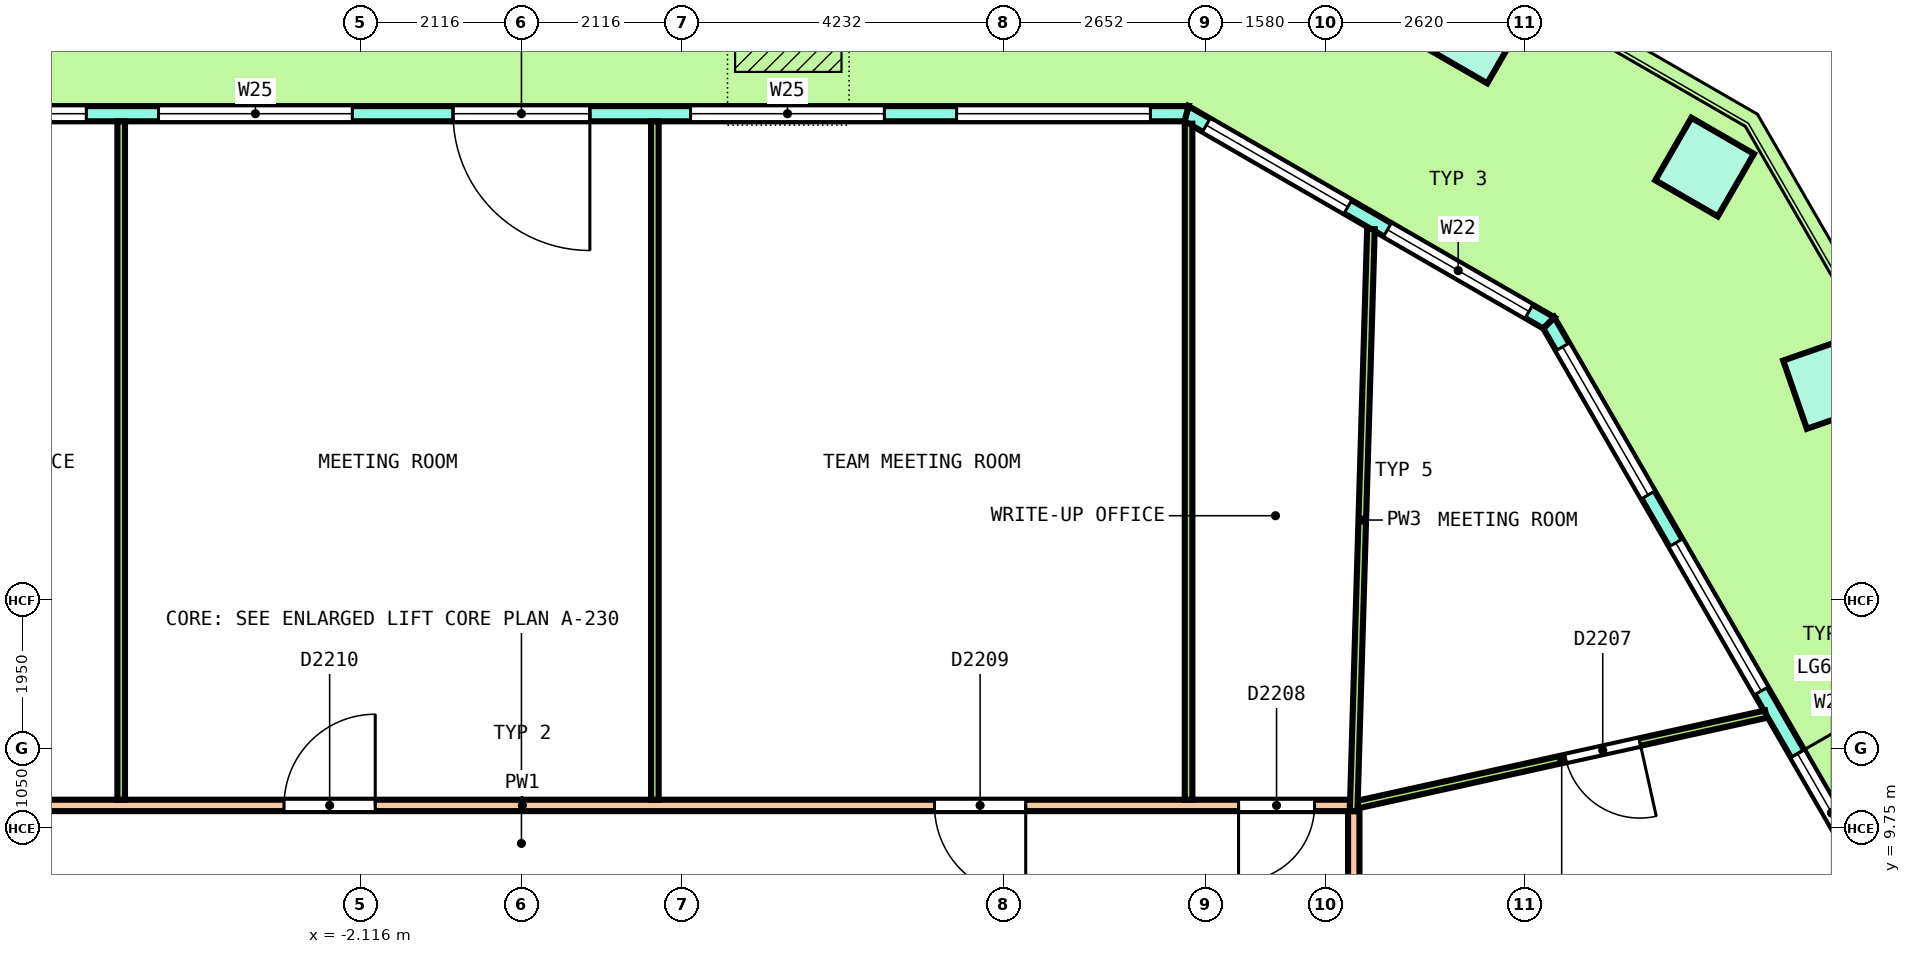
"""IFC4 building model, lengths in metres.
Left out: names, types, materials, properties, quantities, classifications, styles, units other than length and angle.
Written with IfcOpenShell. Run it as: python <this file> out.ifc"""

import sys

from ifc_helpers import new_model, si_unit, direction, frame, frame_2d, origin, origin_2d, place, context, subcontext, project, spatial, polyline, rectangle, outline, extrude, element, fill, save


model = new_model("IFC4")
c1 = context("Model", 3, precision=1e-05, world=origin(), true_north=direction((0.0, 1.0)))
c2 = subcontext(c1, "Body", "Model", "MODEL_VIEW")
j1 = project(units=[si_unit("LENGTHUNIT", "METRE"), si_unit("PLANEANGLEUNIT", "RADIAN")], contexts=[c1])
p1 = place(None, origin())
s1 = spatial("IfcSite", under=j1, at=p1, CompositionType="ELEMENT")
p2 = place(p1, origin())
s2 = spatial("IfcBuilding", under=s1, at=p2, CompositionType="ELEMENT")
p3 = place(p2, frame((0.0, 0.0, 287.0)))
s3 = spatial("IfcBuildingStorey", under=s2, at=p3, CompositionType="ELEMENT", Elevation=287.0)
p4 = place(p3, frame((17.204, 15.61, 0.0), z_axis=(0.032624119908, 0.006284154245, 0.999447935715), x_axis=(-0.500158635794, 0.8658654173, 0.01088201104)))
e1 = element("IfcColumn", 1, at=p4, inside=s3, PredefinedType="COLUMN", context=c2, shape_type="SweptSolid", body=[
    extrude(rectangle(XDim=0.95, YDim=0.95, at=origin_2d()), origin(), (0.0, 0.0, 1.0), 3.652),
])
for number, where, z_axis, x_axis in (
    (2, (15.566, 18.448, 0.0), (0.036, 0.0, 0.999), (-0.865, 0.5, 0.031)),
    (3, (12.533, 20.199, 0.0), (0.036, 0.0, 0.999), (-0.865, 0.5, 0.031)),
):
    element("IfcColumn", number, at=place(p3, frame(where, z_axis=z_axis, x_axis=x_axis)), inside=s3, PredefinedType="COLUMN", context=c2, shape_type="SweptSolid", body=[
        extrude(rectangle(XDim=0.95, YDim=0.95, at=origin_2d()), origin(), (0.0, 0.0, 1.0), 3.652),
    ])
p5 = place(p3, frame((20.959, 3.506, 0.0), z_axis=(0.0, 0.0, 1.0), x_axis=(-0.499998331335, 0.866026367187, 0.0)))
e4 = element("IfcWall", 4, at=p5, inside=s3, PredefinedType="SOLIDWALL", context=c2, shape_type="SweptSolid", body=[
    extrude(outline(polyline([(-0.027, -0.1), (1.04, -0.1), (2.107, -0.1), (3.175, -0.1), (4.242, -0.1), (5.309, -0.1), (6.376, -0.1), (7.443, -0.1), (8.51, -0.1), (9.578, -0.1), (10.645, -0.1), (11.712, -0.1), (12.779, -0.1), (13.846, -0.1), (14.914, -0.1), (14.86, 0.1), (13.8, 0.1), (12.741, 0.1), (11.681, 0.1), (10.622, 0.1), (9.562, 0.1), (8.503, 0.1), (7.443, 0.1), (6.384, 0.1), (5.324, 0.1), (4.265, 0.1), (3.205, 0.1), (2.146, 0.1), (1.086, 0.1), (0.027, 0.1), (-0.027, -0.1)])), origin(), (0.0, 0.0, 1.0), 3.7),
])
p6 = place(p5, frame((0.364, 0.0, 0.1)))
e5 = element("IfcOpeningElement", 5, at=p6, cuts=e4, PredefinedType="OPENING", context=c2, shape_type="SweptSolid", body=[
    extrude(rectangle(XDim=2.25, YDim=2.75, at=frame_2d((1.125, 1.375))), frame((0.0, 0.11, 0.0), z_axis=(0.0, -1.0, 0.0), x_axis=(1.0, 0.0, 0.0)), (0.0, 0.0, 1.0), 0.22),
])
p7 = place(p5, frame((3.341, 0.0, 0.1)))
e6 = element("IfcOpeningElement", 6, at=p7, cuts=e4, PredefinedType="OPENING", context=c2, shape_type="SweptSolid", body=[
    extrude(rectangle(XDim=2.25, YDim=2.75, at=frame_2d((1.125, 1.375))), frame((0.0, 0.11, 0.0), z_axis=(0.0, -1.0, 0.0), x_axis=(1.0, 0.0, 0.0)), (0.0, 0.0, 1.0), 0.22),
])
p8 = place(p5, frame((6.543, 0.0, 0.0)))
e7 = element("IfcOpeningElement", 7, at=p8, cuts=e4, PredefinedType="OPENING", context=c2, shape_type="SweptSolid", body=[
    extrude(rectangle(XDim=1.8, YDim=2.4, at=frame_2d((0.9, 1.2))), frame((0.0, 0.11, 0.0), z_axis=(0.0, -1.0, 0.0), x_axis=(1.0, 0.0, 0.0)), (0.0, 0.0, 1.0), 0.22),
])
p9 = place(p5, frame((6.543, 0.0, 2.55)))
e8 = element("IfcOpeningElement", 8, at=p9, cuts=e4, PredefinedType="OPENING", context=c2, shape_type="SweptSolid", body=[
    extrude(rectangle(XDim=1.8, YDim=0.3, at=frame_2d((0.9, 0.15))), frame((0.0, 0.11, 0.0), z_axis=(0.0, -1.0, 0.0), x_axis=(1.0, 0.0, 0.0)), (0.0, 0.0, 1.0), 0.22),
])
p10 = place(p5, frame((9.296, 0.0, 0.1)))
e9 = element("IfcOpeningElement", 9, at=p10, cuts=e4, PredefinedType="OPENING", context=c2, shape_type="SweptSolid", body=[
    extrude(rectangle(XDim=2.25, YDim=2.75, at=frame_2d((1.125, 1.375))), frame((0.0, 0.11, 0.0), z_axis=(0.0, -1.0, 0.0), x_axis=(1.0, 0.0, 0.0)), (0.0, 0.0, 1.0), 0.22),
])
p11 = place(p5, frame((12.273, 0.0, 0.1)))
e10 = element("IfcOpeningElement", 10, at=p11, cuts=e4, PredefinedType="OPENING", context=c2, shape_type="SweptSolid", body=[
    extrude(rectangle(XDim=2.25, YDim=2.75, at=frame_2d((1.125, 1.375))), frame((0.0, 0.11, 0.0), z_axis=(0.0, -1.0, 0.0), x_axis=(1.0, 0.0, 0.0)), (0.0, 0.0, 1.0), 0.22),
])
p12 = place(p3, frame((13.516, 16.398, 0.0), z_axis=(0.0, 0.0, 1.0), x_axis=(-0.866026017613, 0.499998936816, 0.0)))
e11 = element("IfcWall", 11, at=p12, inside=s3, PredefinedType="SOLIDWALL", context=c2, shape_type="SweptSolid", body=[
    extrude(outline(polyline([(-0.027, -0.1), (1.084, -0.1), (2.196, -0.1), (3.307, -0.1), (4.419, -0.1), (5.53, -0.1), (5.477, 0.1), (4.387, 0.1), (3.297, 0.1), (2.207, 0.1), (1.117, 0.1), (0.027, 0.1), (-0.027, -0.1)])), origin(), (0.0, 0.0, 1.0), 3.7),
])
p13 = place(p12, frame((0.301, 0.0, 0.1)))
e12 = element("IfcOpeningElement", 12, at=p13, cuts=e11, PredefinedType="OPENING", context=c2, shape_type="SweptSolid", body=[
    extrude(rectangle(XDim=2.15, YDim=2.75, at=frame_2d((1.075, 1.375))), frame((0.0, 0.11, 0.0), z_axis=(0.0, -1.0, 0.0), x_axis=(1.0, 0.0, 0.0)), (0.0, 0.0, 1.0), 0.22),
])
p14 = place(p12, frame((3.052, 0.0, 0.1)))
e13 = element("IfcOpeningElement", 13, at=p14, cuts=e11, PredefinedType="OPENING", context=c2, shape_type="SweptSolid", body=[
    extrude(rectangle(XDim=2.15, YDim=2.75, at=frame_2d((1.075, 1.375))), frame((0.0, 0.11, 0.0), z_axis=(0.0, -1.0, 0.0), x_axis=(1.0, 0.0, 0.0)), (0.0, 0.0, 1.0), 0.22),
])
p15 = place(p3, frame((8.75, 19.15, 0.0), z_axis=(0.0, 0.0, 1.0), x_axis=(-1.0, 0.0, 0.0)))
e14 = element("IfcWall", 14, at=p15, inside=s3, PredefinedType="SOLIDWALL", context=c2, shape_type="SweptSolid", body=[
    extrude(outline(polyline([(-0.027, -0.1), (1.006, -0.1), (2.038, -0.1), (3.071, -0.1), (4.103, -0.1), (5.136, -0.1), (6.168, -0.1), (7.201, -0.1), (8.233, -0.1), (9.266, -0.1), (10.299, -0.1), (11.331, -0.1), (12.364, -0.1), (13.396, -0.1), (14.429, -0.1), (15.461, -0.1), (16.494, -0.1), (17.526, -0.1), (17.473, 0.1), (16.447, 0.1), (15.42, 0.1), (14.394, 0.1), (13.368, 0.1), (12.342, 0.1), (11.315, 0.1), (10.289, 0.1), (9.263, 0.1), (8.237, 0.1), (7.21, 0.1), (6.184, 0.1), (5.158, 0.1), (4.132, 0.1), (3.105, 0.1), (2.079, 0.1), (1.053, 0.1), (0.027, 0.1), (-0.027, -0.1)])), origin(), (0.0, 0.0, 1.0), 3.7),
])
p16 = place(p15, frame((0.475, 0.0, 0.1)))
e15 = element("IfcOpeningElement", 15, at=p16, cuts=e14, PredefinedType="OPENING", context=c2, shape_type="SweptSolid", body=[
    extrude(rectangle(XDim=2.55, YDim=2.75, at=frame_2d((1.275, 1.375))), frame((0.0, 0.11, 0.0), z_axis=(0.0, -1.0, 0.0), x_axis=(1.0, 0.0, 0.0)), (0.0, 0.0, 1.0), 0.22),
])
p17 = place(p15, frame((3.975, 0.0, 0.1)))
e16 = element("IfcOpeningElement", 16, at=p17, cuts=e14, PredefinedType="OPENING", context=c2, shape_type="SweptSolid", body=[
    extrude(rectangle(XDim=2.55, YDim=2.75, at=frame_2d((1.275, 1.375))), frame((0.0, 0.11, 0.0), z_axis=(0.0, -1.0, 0.0), x_axis=(1.0, 0.0, 0.0)), (0.0, 0.0, 1.0), 0.22),
])
p18 = place(p15, frame((7.85, 0.0, 0.0)))
e17 = element("IfcOpeningElement", 17, at=p18, cuts=e14, PredefinedType="OPENING", context=c2, shape_type="SweptSolid", body=[
    extrude(rectangle(XDim=1.8, YDim=2.4, at=frame_2d((0.9, 1.2))), frame((0.0, 0.11, 0.0), z_axis=(0.0, -1.0, 0.0), x_axis=(1.0, 0.0, 0.0)), (0.0, 0.0, 1.0), 0.22),
])
p19 = place(p15, frame((7.85, 0.0, 2.55)))
e18 = element("IfcOpeningElement", 18, at=p19, cuts=e14, PredefinedType="OPENING", context=c2, shape_type="SweptSolid", body=[
    extrude(rectangle(XDim=1.8, YDim=0.3, at=frame_2d((0.9, 0.15))), frame((0.0, 0.11, 0.0), z_axis=(0.0, -1.0, 0.0), x_axis=(1.0, 0.0, 0.0)), (0.0, 0.0, 1.0), 0.22),
])
p20 = place(p15, frame((10.975, 0.0, 0.1)))
e19 = element("IfcOpeningElement", 19, at=p20, cuts=e14, PredefinedType="OPENING", context=c2, shape_type="SweptSolid", body=[
    extrude(rectangle(XDim=2.55, YDim=2.75, at=frame_2d((1.275, 1.375))), frame((0.0, 0.11, 0.0), z_axis=(0.0, -1.0, 0.0), x_axis=(1.0, 0.0, 0.0)), (0.0, 0.0, 1.0), 0.22),
])
p21 = place(p15, frame((14.475, 0.0, 0.1)))
e20 = element("IfcOpeningElement", 20, at=p21, cuts=e14, PredefinedType="OPENING", context=c2, shape_type="SweptSolid", body=[
    extrude(rectangle(XDim=2.55, YDim=2.75, at=frame_2d((1.275, 1.375))), frame((0.0, 0.11, 0.0), z_axis=(0.0, -1.0, 0.0), x_axis=(1.0, 0.0, 0.0)), (0.0, 0.0, 1.0), 0.22),
])
p22 = place(p3, frame((10.95, -7.025, 0.0), z_axis=(0.0, 0.0, 1.0), x_axis=(0.0, 1.0, 0.0)))
e21 = element("IfcWall", 21, at=p22, inside=s3, PredefinedType="PARTITIONING", context=c2, shape_type="SweptSolid", body=[
    extrude(rectangle(XDim=17.0, YDim=0.15, at=frame_2d((8.5, 0.0))), origin(), (0.0, 0.0, 1.0), 2.9),
])
p23 = place(p22, frame((8.507, 0.0, 0.0)))
e22 = element("IfcOpeningElement", 22, at=p23, cuts=e21, PredefinedType="OPENING", context=c2, shape_type="SweptSolid", body=[
    extrude(rectangle(XDim=1.0, YDim=2.1, at=frame_2d((0.5, 1.05))), frame((0.0, 0.085, 0.0), z_axis=(0.0, -1.0, 0.0), x_axis=(1.0, 0.0, 0.0)), (0.0, 0.0, 1.0), 0.17),
])
p24 = place(p22, frame((12.524, 0.0, 0.0)))
e23 = element("IfcOpeningElement", 23, at=p24, cuts=e21, PredefinedType="OPENING", context=c2, shape_type="SweptSolid", body=[
    extrude(rectangle(XDim=1.2, YDim=2.1, at=frame_2d((0.6, 1.05))), frame((0.0, 0.085, 0.0), z_axis=(0.0, -1.0, 0.0), x_axis=(1.0, 0.0, 0.0)), (0.0, 0.0, 1.0), 0.17),
])
p25 = place(p22, frame((2.646, 0.0, 0.0)))
e24 = element("IfcOpeningElement", 24, at=p25, cuts=e21, PredefinedType="OPENING", context=c2, shape_type="SweptSolid", body=[
    extrude(rectangle(XDim=1.0, YDim=2.1, at=frame_2d((0.5, 1.05))), frame((0.0, 0.085, 0.0), z_axis=(0.0, -1.0, 0.0), x_axis=(1.0, 0.0, 0.0)), (0.0, 0.0, 1.0), 0.17),
])
p26 = place(p22, frame((5.728, 0.0, 0.0)))
e25 = element("IfcOpeningElement", 25, at=p26, cuts=e21, PredefinedType="OPENING", context=c2, shape_type="SweptSolid", body=[
    extrude(rectangle(XDim=1.0, YDim=2.1, at=frame_2d((0.5, 1.05))), frame((0.0, 0.085, 0.0), z_axis=(0.0, -1.0, 0.0), x_axis=(1.0, 0.0, 0.0)), (0.0, 0.0, 1.0), 0.17),
])
p27 = place(p3, frame((-10.875, 10.05, 0.0), z_axis=(0.0, 0.0, 1.0), x_axis=(1.0, 0.0, 0.0)))
e26 = element("IfcWall", 26, at=p27, inside=s3, PredefinedType="PARTITIONING", context=c2, shape_type="SweptSolid", body=[
    extrude(rectangle(XDim=21.775, YDim=0.15, at=frame_2d((10.887, 0.0))), origin(), (0.0, 0.0, 1.0), 2.9),
])
p28 = place(p27, frame((20.309, 0.0, 0.0)))
e27 = element("IfcOpeningElement", 27, at=p28, cuts=e26, PredefinedType="OPENING", context=c2, shape_type="SweptSolid", body=[
    extrude(rectangle(XDim=1.0, YDim=2.1, at=frame_2d((0.5, 1.05))), frame((0.0, 0.085, 0.0), z_axis=(0.0, -1.0, 0.0), x_axis=(1.0, 0.0, 0.0)), (0.0, 0.0, 1.0), 0.17),
])
p29 = place(p27, frame((16.309, 0.0, 0.0)))
e28 = element("IfcOpeningElement", 28, at=p29, cuts=e26, PredefinedType="OPENING", context=c2, shape_type="SweptSolid", body=[
    extrude(rectangle(XDim=1.2, YDim=2.1, at=frame_2d((0.6, 1.05))), frame((0.0, 0.085, 0.0), z_axis=(0.0, -1.0, 0.0), x_axis=(1.0, 0.0, 0.0)), (0.0, 0.0, 1.0), 0.17),
])
p30 = place(p27, frame((7.751, 0.0, 0.0)))
e29 = element("IfcOpeningElement", 29, at=p30, cuts=e26, PredefinedType="OPENING", context=c2, shape_type="SweptSolid", body=[
    extrude(rectangle(XDim=1.2, YDim=2.1, at=frame_2d((0.6, 1.05))), frame((0.0, 0.085, 0.0), z_axis=(0.0, -1.0, 0.0), x_axis=(1.0, 0.0, 0.0)), (0.0, 0.0, 1.0), 0.17),
])
p31 = place(p27, frame((2.901, 0.0, 0.0)))
e30 = element("IfcOpeningElement", 30, at=p31, cuts=e26, PredefinedType="OPENING", context=c2, shape_type="SweptSolid", body=[
    extrude(rectangle(XDim=1.0, YDim=2.1, at=frame_2d((0.5, 1.05))), frame((0.0, 0.085, 0.0), z_axis=(0.0, -1.0, 0.0), x_axis=(1.0, 0.0, 0.0)), (0.0, 0.0, 1.0), 0.17),
])
p32 = place(p3, frame((10.999, 10.061, 0.0), z_axis=(0.0, 0.0, 1.0), x_axis=(0.976347529328, 0.216207081233, 0.0)))
e31 = element("IfcWall", 31, at=p32, inside=s3, PredefinedType="PARTITIONING", context=c2, shape_type="SweptSolid", body=[
    extrude(rectangle(XDim=5.504, YDim=0.1, at=frame_2d((2.752, 0.0))), origin(), (0.0, 0.0, 1.0), 2.9),
])
p33 = place(p32, frame((2.805, 0.0, 0.0)))
e32 = element("IfcOpeningElement", 32, at=p33, cuts=e31, PredefinedType="OPENING", context=c2, shape_type="SweptSolid", body=[
    extrude(rectangle(XDim=1.0, YDim=2.1, at=frame_2d((0.5, 1.05))), frame((0.0, 0.06, 0.0), z_axis=(0.0, -1.0, 0.0), x_axis=(1.0, 0.0, 0.0)), (0.0, 0.0, 1.0), 0.12),
])
p34 = place(p3, frame((10.948, 9.975, 0.0), z_axis=(0.0, 0.0, 1.0), x_axis=(0.029792316329, 0.999556110425, 0.0)))
e33 = element("IfcWall", 33, at=p34, inside=s3, PredefinedType="PARTITIONING", context=c2, shape_type="SweptSolid", body=[
    extrude(rectangle(XDim=7.662, YDim=0.1, at=frame_2d((3.831, 0.0))), origin(), (0.0, 0.0, 1.0), 2.9),
])
p35 = place(p3, frame((8.777, 10.125, 0.0), z_axis=(0.0, 0.0, 1.0), x_axis=(0.0, 1.0, 0.0)))
e34 = element("IfcWall", 34, at=p35, inside=s3, PredefinedType="PARTITIONING", context=c2, shape_type="SweptSolid", body=[
    extrude(rectangle(XDim=8.894, YDim=0.1, at=frame_2d((4.447, 0.0))), origin(), (0.0, 0.0, 1.0), 2.9),
])
for number, where, z_axis, x_axis in (
    (35, (1.755, 10.125, 0.0), (0.0, 0.0, 1.0), (0.0, 1.0, 0.0)),
    (36, (-5.266, 10.125, 0.0), (0.0, 0.0, 1.0), (0.0, 1.0, 0.0)),
):
    element("IfcWall", number, at=place(p3, frame(where, z_axis=z_axis, x_axis=x_axis)), inside=s3, PredefinedType="PARTITIONING", context=c2, shape_type="SweptSolid", body=[
        extrude(rectangle(XDim=8.925, YDim=0.1, at=frame_2d((4.462, 0.0))), origin(), (0.0, 0.0, 1.0), 2.9),
    ])
p36 = place(p8, origin())
e37 = element("IfcDoor", 37, at=p36, inside=s3, OperationType="DOUBLE_DOOR_SINGLE_SWING", PredefinedType="DOOR", context=c2, shape_type="SweptSolid", body=[
    extrude(rectangle(XDim=1.8, YDim=2.4, at=frame_2d((0.9, 1.2))), frame((0.0, 0.025, 0.0), z_axis=(0.0, -1.0, 0.0), x_axis=(1.0, 0.0, 0.0)), (0.0, 0.0, 1.0), 0.05),
])
fill(e7, e37)
p37 = place(p9, origin())
e38 = element("IfcWindow", 38, at=p37, inside=s3, PartitioningType="SINGLE_PANEL", PredefinedType="WINDOW", context=c2, shape_type="SweptSolid", body=[
    extrude(rectangle(XDim=1.8, YDim=0.3, at=frame_2d((0.9, 0.15))), frame((0.0, 0.03, 0.0), z_axis=(0.0, -1.0, 0.0), x_axis=(1.0, 0.0, 0.0)), (0.0, 0.0, 1.0), 0.06),
])
fill(e8, e38)
p38 = place(p10, origin())
e39 = element("IfcWindow", 39, at=p38, inside=s3, PartitioningType="SINGLE_PANEL", PredefinedType="WINDOW", context=c2, shape_type="SweptSolid", body=[
    extrude(rectangle(XDim=2.25, YDim=2.75, at=frame_2d((1.125, 1.375))), frame((0.0, 0.03, 0.0), z_axis=(0.0, -1.0, 0.0), x_axis=(1.0, 0.0, 0.0)), (0.0, 0.0, 1.0), 0.06),
])
fill(e9, e39)
p39 = place(p11, origin())
e40 = element("IfcWindow", 40, at=p39, inside=s3, PartitioningType="SINGLE_PANEL", PredefinedType="WINDOW", context=c2, shape_type="SweptSolid", body=[
    extrude(rectangle(XDim=2.25, YDim=2.75, at=frame_2d((1.125, 1.375))), frame((0.0, 0.03, 0.0), z_axis=(0.0, -1.0, 0.0), x_axis=(1.0, 0.0, 0.0)), (0.0, 0.0, 1.0), 0.06),
])
fill(e10, e40)
p40 = place(p13, origin())
e41 = element("IfcWindow", 41, at=p40, inside=s3, PartitioningType="SINGLE_PANEL", PredefinedType="WINDOW", context=c2, shape_type="SweptSolid", body=[
    extrude(rectangle(XDim=2.15, YDim=2.75, at=frame_2d((1.075, 1.375))), frame((0.0, 0.03, 0.0), z_axis=(0.0, -1.0, 0.0), x_axis=(1.0, 0.0, 0.0)), (0.0, 0.0, 1.0), 0.06),
])
fill(e12, e41)
p41 = place(p14, origin())
e42 = element("IfcWindow", 42, at=p41, inside=s3, PartitioningType="SINGLE_PANEL", PredefinedType="WINDOW", context=c2, shape_type="SweptSolid", body=[
    extrude(rectangle(XDim=2.15, YDim=2.75, at=frame_2d((1.075, 1.375))), frame((0.0, 0.03, 0.0), z_axis=(0.0, -1.0, 0.0), x_axis=(1.0, 0.0, 0.0)), (0.0, 0.0, 1.0), 0.06),
])
fill(e13, e42)
p42 = place(p16, origin())
e43 = element("IfcWindow", 43, at=p42, inside=s3, PartitioningType="SINGLE_PANEL", PredefinedType="WINDOW", context=c2, shape_type="SweptSolid", body=[
    extrude(rectangle(XDim=2.55, YDim=2.75, at=frame_2d((1.275, 1.375))), frame((0.0, 0.03, 0.0), z_axis=(0.0, -1.0, 0.0), x_axis=(1.0, 0.0, 0.0)), (0.0, 0.0, 1.0), 0.06),
])
fill(e15, e43)
p43 = place(p17, origin())
e44 = element("IfcWindow", 44, at=p43, inside=s3, PartitioningType="SINGLE_PANEL", PredefinedType="WINDOW", context=c2, shape_type="SweptSolid", body=[
    extrude(rectangle(XDim=2.55, YDim=2.75, at=frame_2d((1.275, 1.375))), frame((0.0, 0.03, 0.0), z_axis=(0.0, -1.0, 0.0), x_axis=(1.0, 0.0, 0.0)), (0.0, 0.0, 1.0), 0.06),
])
fill(e16, e44)
p44 = place(p18, origin())
e45 = element("IfcDoor", 45, at=p44, inside=s3, OperationType="DOUBLE_DOOR_SINGLE_SWING", PredefinedType="DOOR", context=c2, shape_type="SweptSolid", body=[
    extrude(rectangle(XDim=1.8, YDim=2.4, at=frame_2d((0.9, 1.2))), frame((0.0, 0.025, 0.0), z_axis=(0.0, -1.0, 0.0), x_axis=(1.0, 0.0, 0.0)), (0.0, 0.0, 1.0), 0.05),
])
fill(e17, e45)
p45 = place(p19, origin())
e46 = element("IfcWindow", 46, at=p45, inside=s3, PartitioningType="SINGLE_PANEL", PredefinedType="WINDOW", context=c2, shape_type="SweptSolid", body=[
    extrude(rectangle(XDim=1.8, YDim=0.3, at=frame_2d((0.9, 0.15))), frame((0.0, 0.03, 0.0), z_axis=(0.0, -1.0, 0.0), x_axis=(1.0, 0.0, 0.0)), (0.0, 0.0, 1.0), 0.06),
])
fill(e18, e46)
p46 = place(p20, origin())
e47 = element("IfcWindow", 47, at=p46, inside=s3, PartitioningType="SINGLE_PANEL", PredefinedType="WINDOW", context=c2, shape_type="SweptSolid", body=[
    extrude(rectangle(XDim=2.55, YDim=2.75, at=frame_2d((1.275, 1.375))), frame((0.0, 0.03, 0.0), z_axis=(0.0, -1.0, 0.0), x_axis=(1.0, 0.0, 0.0)), (0.0, 0.0, 1.0), 0.06),
])
fill(e19, e47)
p47 = place(p21, origin())
e48 = element("IfcWindow", 48, at=p47, inside=s3, PartitioningType="SINGLE_PANEL", PredefinedType="WINDOW", context=c2, shape_type="SweptSolid", body=[
    extrude(rectangle(XDim=2.55, YDim=2.75, at=frame_2d((1.275, 1.375))), frame((0.0, 0.03, 0.0), z_axis=(0.0, -1.0, 0.0), x_axis=(1.0, 0.0, 0.0)), (0.0, 0.0, 1.0), 0.06),
])
fill(e20, e48)
p48 = place(p33, origin())
e49 = element("IfcDoor", 49, at=p48, inside=s3, OperationType="SINGLE_SWING_LEFT", PredefinedType="DOOR", context=c2, shape_type="SweptSolid", body=[
    extrude(rectangle(XDim=1.0, YDim=2.1, at=frame_2d((0.5, 1.05))), frame((0.0, 0.025, 0.0), z_axis=(0.0, -1.0, 0.0), x_axis=(1.0, 0.0, 0.0)), (0.0, 0.0, 1.0), 0.05),
])
fill(e32, e49)
p49 = place(p28, origin())
e50 = element("IfcDoor", 50, at=p49, inside=s3, OperationType="SINGLE_SWING_RIGHT", PredefinedType="DOOR", context=c2, shape_type="SweptSolid", body=[
    extrude(rectangle(XDim=1.0, YDim=2.1, at=frame_2d((0.5, 1.05))), frame((0.0, 0.025, 0.0), z_axis=(0.0, -1.0, 0.0), x_axis=(1.0, 0.0, 0.0)), (0.0, 0.0, 1.0), 0.05),
])
fill(e27, e50)
p50 = place(p29, origin())
e51 = element("IfcDoor", 51, at=p50, inside=s3, OperationType="DOUBLE_DOOR_SINGLE_SWING", PredefinedType="DOOR", context=c2, shape_type="SweptSolid", body=[
    extrude(rectangle(XDim=1.2, YDim=2.1, at=frame_2d((0.6, 1.05))), frame((0.0, 0.025, 0.0), z_axis=(0.0, -1.0, 0.0), x_axis=(1.0, 0.0, 0.0)), (0.0, 0.0, 1.0), 0.05),
])
fill(e28, e51)
p51 = place(p30, origin())
e52 = element("IfcDoor", 52, at=p51, inside=s3, OperationType="DOUBLE_DOOR_SINGLE_SWING", PredefinedType="DOOR", context=c2, shape_type="SweptSolid", body=[
    extrude(rectangle(XDim=1.2, YDim=2.1, at=frame_2d((0.6, 1.05))), frame((0.0, 0.025, 0.0), z_axis=(0.0, -1.0, 0.0), x_axis=(1.0, 0.0, 0.0)), (0.0, 0.0, 1.0), 0.05),
])
fill(e29, e52)
save(model, sys.argv[1])
